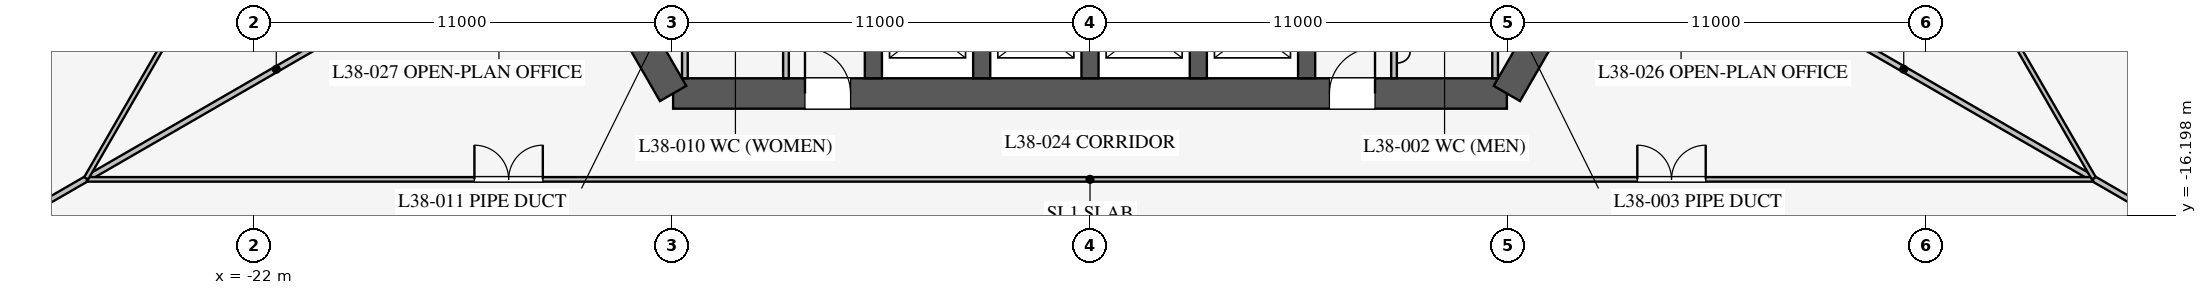
"""IFC4 building model, lengths in metres.
Left out: names, types, materials, properties, quantities, classifications, styles, units other than length and angle.
Written with IfcOpenShell. Run it as: python <this file> out.ifc"""

import sys

from ifc_helpers import new_model, si_unit, direction, frame, frame_2d, origin, place, context, subcontext, project, spatial, rectangle, extrude, element, fill, save


model = new_model("IFC4")
c1 = context("Model", 3, precision=1e-05, world=origin(), true_north=direction((0.0, 1.0)))
c2 = subcontext(c1, "Body", "Model", "MODEL_VIEW")
j1 = project(units=[si_unit("LENGTHUNIT", "METRE"), si_unit("PLANEANGLEUNIT", "RADIAN")], contexts=[c1])
p1 = place(None, origin())
s1 = spatial("IfcSite", under=j1, at=p1, CompositionType="ELEMENT")
p2 = place(p1, origin())
s2 = spatial("IfcBuilding", under=s1, at=p2, CompositionType="ELEMENT")
p3 = place(p2, frame((0.0, 0.0, 166.1)))
s3 = spatial("IfcBuildingStorey", under=s2, at=p3, CompositionType="ELEMENT", Elevation=166.1)
p4 = place(p3, frame((-10.97, -13.0, 0.0), z_axis=(0.0, 0.0, 1.0), x_axis=(1.0, 0.0, 0.0)))
e1 = element("IfcWall", 1, at=p4, inside=s3, PredefinedType="SHEAR", context=c2, shape_type="SweptSolid", body=[
    extrude(rectangle(XDim=21.939, YDim=0.8, at=frame_2d((10.97, 0.0))), origin(), (0.0, 0.0, 1.0), 4.2),
])
p5 = place(p4, frame((17.27, 0.0, 0.0)))
e2 = element("IfcOpeningElement", 2, at=p5, cuts=e1, PredefinedType="OPENING", context=c2, shape_type="SweptSolid", body=[
    extrude(rectangle(XDim=1.2, YDim=2.1, at=frame_2d((0.6, 1.05))), frame((0.0, 0.41, 0.0), z_axis=(0.0, -1.0, 0.0), x_axis=(1.0, 0.0, 0.0)), (0.0, 0.0, 1.0), 0.82),
])
p6 = place(p4, frame((3.47, 0.0, 0.0)))
e3 = element("IfcOpeningElement", 3, at=p6, cuts=e1, PredefinedType="OPENING", context=c2, shape_type="SweptSolid", body=[
    extrude(rectangle(XDim=1.2, YDim=2.1, at=frame_2d((0.6, 1.05))), frame((0.0, 0.41, 0.0), z_axis=(0.0, -1.0, 0.0), x_axis=(1.0, 0.0, 0.0)), (0.0, 0.0, 1.0), 0.82),
])
for number, where, z_axis, x_axis in (
    (4, (10.97, -13.0, 0.0), (0.0, 0.0, 1.0), (0.5, 0.866, 0.0)),
    (5, (-16.743, -3.0, 0.0), (0.0, 0.0, 1.0), (0.5, -0.866, 0.0)),
):
    element("IfcWall", number, at=place(p3, frame(where, z_axis=z_axis, x_axis=x_axis)), inside=s3, PredefinedType="SHEAR", context=c2, shape_type="SweptSolid", body=[
        extrude(rectangle(XDim=11.547, YDim=0.8, at=frame_2d((5.773, 0.0))), origin(), (0.0, 0.0, 1.0), 4.2),
    ])
for number, where, z_axis, x_axis in (
    (6, (-5.7, -10.025, 0.0), (0.0, 0.0, 1.0), (0.0, -1.0, 0.0)),
    (7, (-2.85, -10.025, 0.0), (0.0, 0.0, 1.0), (0.0, -1.0, 0.0)),
    (8, (0.0, -10.025, 0.0), (0.0, 0.0, 1.0), (0.0, -1.0, 0.0)),
    (9, (2.85, -10.025, 0.0), (0.0, 0.0, 1.0), (0.0, -1.0, 0.0)),
    (10, (5.7, -10.025, 0.0), (0.0, 0.0, 1.0), (0.0, -1.0, 0.0)),
):
    element("IfcWall", number, at=place(p3, frame(where, z_axis=z_axis, x_axis=x_axis)), inside=s3, PredefinedType="SHEAR", context=c2, shape_type="SweptSolid", body=[
        extrude(rectangle(XDim=2.575, YDim=0.45, at=frame_2d((1.288, 0.0))), origin(), (0.0, 0.0, 1.0), 4.2),
    ])
p7 = place(p3, frame((8.0, -7.5, 0.0), z_axis=(0.0, 0.0, 1.0), x_axis=(0.0, -1.0, 0.0)))
e11 = element("IfcWall", 11, at=p7, inside=s3, PredefinedType="PARTITIONING", context=c2, shape_type="SweptSolid", body=[
    extrude(rectangle(XDim=5.1, YDim=0.15, at=frame_2d((2.55, 0.0))), origin(), (0.0, 0.0, 1.0), 4.0),
])
p8 = place(p7, frame((1.3, 0.0, 0.0)))
e12 = element("IfcOpeningElement", 12, at=p8, cuts=e11, PredefinedType="OPENING", context=c2, shape_type="SweptSolid", body=[
    extrude(rectangle(XDim=0.9, YDim=2.1, at=frame_2d((0.45, 1.05))), frame((0.0, 0.085, 0.0), z_axis=(0.0, -1.0, 0.0), x_axis=(1.0, 0.0, 0.0)), (0.0, 0.0, 1.0), 0.17),
])
p9 = place(p3, frame((-8.0, -7.5, 0.0), z_axis=(0.0, 0.0, 1.0), x_axis=(0.0, -1.0, 0.0)))
e13 = element("IfcWall", 13, at=p9, inside=s3, PredefinedType="PARTITIONING", context=c2, shape_type="SweptSolid", body=[
    extrude(rectangle(XDim=5.1, YDim=0.15, at=frame_2d((2.55, 0.0))), origin(), (0.0, 0.0, 1.0), 4.0),
])
p10 = place(p9, frame((2.6, 0.0, 0.0)))
e14 = element("IfcOpeningElement", 14, at=p10, cuts=e13, PredefinedType="OPENING", context=c2, shape_type="SweptSolid", body=[
    extrude(rectangle(XDim=0.9, YDim=2.1, at=frame_2d((0.45, 1.05))), frame((0.0, 0.085, 0.0), z_axis=(0.0, -1.0, 0.0), x_axis=(1.0, 0.0, 0.0)), (0.0, 0.0, 1.0), 0.17),
])
for number, where, z_axis, x_axis in (
    (15, (10.66, -8.5, 0.0), (0.0, 0.0, 1.0), (0.0, -1.0, 0.0)),
    (16, (-10.66, -8.5, 0.0), (0.0, 0.0, 1.0), (0.0, -1.0, 0.0)),
):
    element("IfcWall", number, at=place(p3, frame(where, z_axis=z_axis, x_axis=x_axis)), inside=s3, PredefinedType="PARTITIONING", context=c2, shape_type="SweptSolid", body=[
        extrude(rectangle(XDim=4.1, YDim=0.15, at=frame_2d((2.05, 0.0))), origin(), (0.0, 0.0, 1.0), 4.0),
    ])
for number, where, z_axis, x_axis in (
    (17, (14.203, -8.2, 0.0), (0.0, 0.0, 1.0), (0.866, -0.5, 0.0)),
    (18, (-14.203, -8.2, 0.0), (0.0, 0.0, 1.0), (-0.866, -0.5, 0.0)),
):
    element("IfcWall", number, at=place(p3, frame(where, z_axis=z_axis, x_axis=x_axis)), inside=s3, PredefinedType="PARTITIONING", context=c2, shape_type="SweptSolid", body=[
        extrude(rectangle(XDim=16.65, YDim=0.15, at=frame_2d((8.325, 0.0))), origin(), (0.0, 0.0, 1.0), 2.3),
    ])
p11 = place(p3, frame((-26.398, -15.26, 0.0), z_axis=(0.0, 0.0, 1.0), x_axis=(1.0, 0.0, 0.0)))
e19 = element("IfcWall", 19, at=p11, inside=s3, PredefinedType="PARTITIONING", context=c2, shape_type="SweptSolid", body=[
    extrude(rectangle(XDim=52.796, YDim=0.12, at=frame_2d((26.398, 0.0))), origin(), (0.0, 0.0, 1.0), 2.9),
])
p12 = place(p11, frame((10.2, 0.0, 0.15)))
e20 = element("IfcOpeningElement", 20, at=p12, cuts=e19, PredefinedType="OPENING", context=c2, shape_type="SweptSolid", body=[
    extrude(rectangle(XDim=1.8, YDim=2.1, at=frame_2d((0.9, 1.05))), frame((0.0, 0.07, 0.0), z_axis=(0.0, -1.0, 0.0), x_axis=(1.0, 0.0, 0.0)), (0.0, 0.0, 1.0), 0.14),
])
p13 = place(p11, frame((40.8, 0.0, 0.15)))
e21 = element("IfcOpeningElement", 21, at=p13, cuts=e19, PredefinedType="OPENING", context=c2, shape_type="SweptSolid", body=[
    extrude(rectangle(XDim=1.8, YDim=2.1, at=frame_2d((0.9, 1.05))), frame((0.0, 0.07, 0.0), z_axis=(0.0, -1.0, 0.0), x_axis=(1.0, 0.0, 0.0)), (0.0, 0.0, 1.0), 0.14),
])
p14 = place(p3, frame((26.415, -15.231, 0.0), z_axis=(0.0, 0.0, 1.0), x_axis=(-0.50000091641, 0.866024874695, 0.0)))
e22 = element("IfcWall", 22, at=p14, inside=s3, PredefinedType="PARTITIONING", context=c2, shape_type="SweptSolid", body=[
    extrude(rectangle(XDim=52.796, YDim=0.12, at=frame_2d((26.398, 0.0))), origin(), (0.0, 0.0, 1.0), 2.9),
])
p15 = place(p14, frame((10.2, 0.0, 0.15)))
e23 = element("IfcOpeningElement", 23, at=p15, cuts=e22, PredefinedType="OPENING", context=c2, shape_type="SweptSolid", body=[
    extrude(rectangle(XDim=1.8, YDim=2.1, at=frame_2d((0.9, 1.05))), frame((0.0, 0.07, 0.0), z_axis=(0.0, -1.0, 0.0), x_axis=(1.0, 0.0, 0.0)), (0.0, 0.0, 1.0), 0.14),
])
p16 = place(p14, frame((40.8, 0.0, 0.15)))
e24 = element("IfcOpeningElement", 24, at=p16, cuts=e22, PredefinedType="OPENING", context=c2, shape_type="SweptSolid", body=[
    extrude(rectangle(XDim=1.8, YDim=2.1, at=frame_2d((0.9, 1.05))), frame((0.0, 0.07, 0.0), z_axis=(0.0, -1.0, 0.0), x_axis=(1.0, 0.0, 0.0)), (0.0, 0.0, 1.0), 0.14),
])
p17 = place(p3, frame((-0.016, 30.491, 0.0), z_axis=(0.0, 0.0, 1.0), x_axis=(-0.50000091641, -0.866024874695, 0.0)))
e25 = element("IfcWall", 25, at=p17, inside=s3, PredefinedType="PARTITIONING", context=c2, shape_type="SweptSolid", body=[
    extrude(rectangle(XDim=52.796, YDim=0.12, at=frame_2d((26.398, 0.0))), origin(), (0.0, 0.0, 1.0), 2.9),
])
p18 = place(p17, frame((10.2, 0.0, 0.15)))
e26 = element("IfcOpeningElement", 26, at=p18, cuts=e25, PredefinedType="OPENING", context=c2, shape_type="SweptSolid", body=[
    extrude(rectangle(XDim=1.8, YDim=2.1, at=frame_2d((0.9, 1.05))), frame((0.0, 0.07, 0.0), z_axis=(0.0, -1.0, 0.0), x_axis=(1.0, 0.0, 0.0)), (0.0, 0.0, 1.0), 0.14),
])
p19 = place(p17, frame((40.8, 0.0, 0.15)))
e27 = element("IfcOpeningElement", 27, at=p19, cuts=e25, PredefinedType="OPENING", context=c2, shape_type="SweptSolid", body=[
    extrude(rectangle(XDim=1.8, YDim=2.1, at=frame_2d((0.9, 1.05))), frame((0.0, 0.07, 0.0), z_axis=(0.0, -1.0, 0.0), x_axis=(1.0, 0.0, 0.0)), (0.0, 0.0, 1.0), 0.14),
])
p20 = place(p5, origin())
e28 = element("IfcDoor", 28, at=p20, inside=s3, OperationType="SINGLE_SWING_RIGHT", PredefinedType="DOOR", context=c2, shape_type="SweptSolid", body=[
    extrude(rectangle(XDim=1.2, YDim=2.1, at=frame_2d((0.6, 1.05))), frame((0.0, 0.025, 0.0), z_axis=(0.0, -1.0, 0.0), x_axis=(1.0, 0.0, 0.0)), (0.0, 0.0, 1.0), 0.05),
])
fill(e2, e28)
p21 = place(p6, origin())
e29 = element("IfcDoor", 29, at=p21, inside=s3, OperationType="SINGLE_SWING_LEFT", PredefinedType="DOOR", context=c2, shape_type="SweptSolid", body=[
    extrude(rectangle(XDim=1.2, YDim=2.1, at=frame_2d((0.6, 1.05))), frame((0.0, 0.025, 0.0), z_axis=(0.0, -1.0, 0.0), x_axis=(1.0, 0.0, 0.0)), (0.0, 0.0, 1.0), 0.05),
])
fill(e3, e29)
p22 = place(p12, origin())
e30 = element("IfcDoor", 30, at=p22, inside=s3, OperationType="DOUBLE_DOOR_SINGLE_SWING", PredefinedType="DOOR", context=c2, shape_type="SweptSolid", body=[
    extrude(rectangle(XDim=1.8, YDim=2.1, at=frame_2d((0.9, 1.05))), frame((0.0, 0.025, 0.0), z_axis=(0.0, -1.0, 0.0), x_axis=(1.0, 0.0, 0.0)), (0.0, 0.0, 1.0), 0.05),
])
fill(e20, e30)
p23 = place(p13, origin())
e31 = element("IfcDoor", 31, at=p23, inside=s3, OperationType="DOUBLE_DOOR_SINGLE_SWING", PredefinedType="DOOR", context=c2, shape_type="SweptSolid", body=[
    extrude(rectangle(XDim=1.8, YDim=2.1, at=frame_2d((0.9, 1.05))), frame((0.0, 0.025, 0.0), z_axis=(0.0, -1.0, 0.0), x_axis=(1.0, 0.0, 0.0)), (0.0, 0.0, 1.0), 0.05),
])
fill(e21, e31)
save(model, sys.argv[1])
